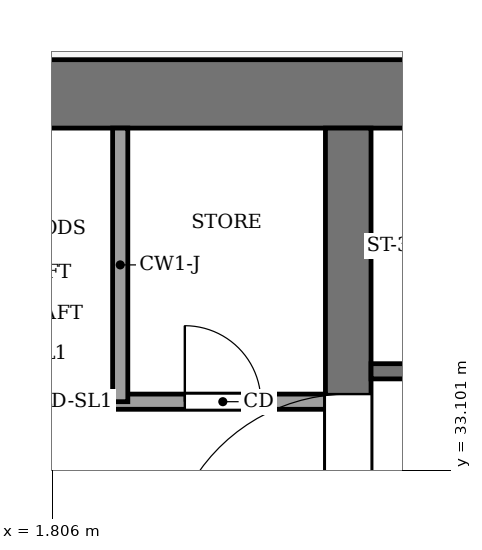
"""IFC4 building model, lengths in metres.
Left out: names, types, materials, properties, quantities, classifications, styles, units other than length and angle.
Written with IfcOpenShell. Run it as: python <this file> out.ifc"""

import sys

from ifc_helpers import new_model, si_unit, direction, frame, frame_2d, origin, place, context, subcontext, project, spatial, rectangle, extrude, element, fill, save


model = new_model("IFC4")
c1 = context("Model", 3, precision=1e-05, world=origin(), true_north=direction((0.0, 1.0)))
c2 = subcontext(c1, "Body", "Model", "MODEL_VIEW")
j1 = project(units=[si_unit("LENGTHUNIT", "METRE"), si_unit("PLANEANGLEUNIT", "RADIAN")], contexts=[c1])
p1 = place(None, origin())
s1 = spatial("IfcSite", under=j1, at=p1, CompositionType="ELEMENT")
p2 = place(p1, origin())
s2 = spatial("IfcBuilding", under=s1, at=p2, CompositionType="ELEMENT")
p3 = place(p2, frame((0.0, 0.0, 226.0)))
s3 = spatial("IfcBuildingStorey", under=s2, at=p3, CompositionType="ELEMENT", Elevation=226.0)
p4 = place(p3, frame((-13.5, 38.05, -0.25), z_axis=(0.0, 0.0, 1.0), x_axis=(1.0, 0.0, 0.0)))
e1 = element("IfcWall", 1, at=p4, inside=s3, PredefinedType="SHEAR", context=c2, shape_type="SweptSolid", body=[
    extrude(rectangle(XDim=27.0, YDim=0.9, at=frame_2d((13.5, 0.0))), origin(), (0.0, 0.0, 1.0), 7.12),
])
p5 = place(p3, frame((5.7, 18.4, -0.25), z_axis=(0.0, 0.0, 1.0), x_axis=(0.0, 1.0, 0.0)))
e2 = element("IfcWall", 2, at=p5, inside=s3, PredefinedType="SHEAR", context=c2, shape_type="SweptSolid", body=[
    extrude(rectangle(XDim=19.2, YDim=0.6, at=frame_2d((9.6, 0.0))), origin(), (0.0, 0.0, 1.0), 7.12),
])
p6 = place(p5, frame((13.3, 0.0, 0.25)))
e3 = element("IfcOpeningElement", 3, at=p6, cuts=e2, PredefinedType="OPENING", context=c2, shape_type="SweptSolid", body=[
    extrude(rectangle(XDim=2.4, YDim=2.4, at=frame_2d((1.2, 1.2))), frame((0.0, 0.31, 0.0), z_axis=(0.0, -1.0, 0.0), x_axis=(1.0, 0.0, 0.0)), (0.0, 0.0, 1.0), 0.62),
])
p7 = place(p3, frame((-5.4, 34.0, 0.0), z_axis=(0.0, 0.0, 1.0), x_axis=(1.0, 0.0, 0.0)))
e4 = element("IfcWall", 4, at=p7, inside=s3, PredefinedType="PARTITIONING", context=c2, shape_type="SweptSolid", body=[
    extrude(rectangle(XDim=10.8, YDim=0.2, at=frame_2d((5.4, 0.0))), origin(), (0.0, 0.0, 1.0), 6.87),
])
p8 = place(p7, frame((6.15, 0.0, 0.0)))
e5 = element("IfcOpeningElement", 5, at=p8, cuts=e4, PredefinedType="OPENING", context=c2, shape_type="SweptSolid", body=[
    extrude(rectangle(XDim=1.2, YDim=2.2, at=frame_2d((0.6, 1.1))), frame((0.0, 0.11, 0.0), z_axis=(0.0, -1.0, 0.0), x_axis=(1.0, 0.0, 0.0)), (0.0, 0.0, 1.0), 0.22),
])
p9 = place(p7, frame((8.95, 0.0, 0.0)))
e6 = element("IfcOpeningElement", 6, at=p9, cuts=e4, PredefinedType="OPENING", context=c2, shape_type="SweptSolid", body=[
    extrude(rectangle(XDim=1.0, YDim=2.1, at=frame_2d((0.5, 1.05))), frame((0.0, 0.11, 0.0), z_axis=(0.0, -1.0, 0.0), x_axis=(1.0, 0.0, 0.0)), (0.0, 0.0, 1.0), 0.22),
])
p10 = place(p3, frame((6.0, 34.4, 0.0), z_axis=(0.0, 0.0, 1.0), x_axis=(1.0, 0.0, 0.0)))
e7 = element("IfcWall", 7, at=p10, inside=s3, PredefinedType="PARTITIONING", context=c2, shape_type="SweptSolid", body=[
    extrude(rectangle(XDim=6.6, YDim=0.2, at=frame_2d((3.3, 0.0))), origin(), (0.0, 0.0, 1.0), 6.87),
])
p11 = place(p10, frame((4.8, 0.0, 0.0)))
e8 = element("IfcOpeningElement", 8, at=p11, cuts=e7, PredefinedType="OPENING", context=c2, shape_type="SweptSolid", body=[
    extrude(rectangle(XDim=1.2, YDim=2.2, at=frame_2d((0.6, 1.1))), frame((0.0, 0.11, 0.0), z_axis=(0.0, -1.0, 0.0), x_axis=(1.0, 0.0, 0.0)), (0.0, 0.0, 1.0), 0.22),
])
p12 = place(p3, frame((2.7, 34.0, 0.0), z_axis=(0.0, 0.0, 1.0), x_axis=(0.0, 1.0, 0.0)))
e9 = element("IfcWall", 9, at=p12, inside=s3, PredefinedType="PARTITIONING", context=c2, shape_type="SweptSolid", body=[
    extrude(rectangle(XDim=3.6, YDim=0.2, at=frame_2d((1.8, 0.0))), origin(), (0.0, 0.0, 1.0), 6.87),
])
p13 = place(p8, origin())
e10 = element("IfcDoor", 10, at=p13, inside=s3, OperationType="SLIDING_TO_LEFT", PredefinedType="DOOR", context=c2, shape_type="SweptSolid", body=[
    extrude(rectangle(XDim=1.2, YDim=2.2, at=frame_2d((0.6, 1.1))), frame((0.0, 0.025, 0.0), z_axis=(0.0, -1.0, 0.0), x_axis=(1.0, 0.0, 0.0)), (0.0, 0.0, 1.0), 0.05),
])
fill(e5, e10)
p14 = place(p9, origin())
e11 = element("IfcDoor", 11, at=p14, inside=s3, OperationType="SINGLE_SWING_LEFT", PredefinedType="DOOR", context=c2, shape_type="SweptSolid", body=[
    extrude(rectangle(XDim=1.0, YDim=2.1, at=frame_2d((0.5, 1.05))), frame((0.0, 0.025, 0.0), z_axis=(0.0, -1.0, 0.0), x_axis=(1.0, 0.0, 0.0)), (0.0, 0.0, 1.0), 0.05),
])
fill(e6, e11)
p15 = place(p6, origin())
e12 = element("IfcDoor", 12, at=p15, inside=s3, OperationType="DOUBLE_DOOR_SINGLE_SWING", PredefinedType="DOOR", context=c2, shape_type="SweptSolid", body=[
    extrude(rectangle(XDim=2.4, YDim=2.4, at=frame_2d((1.2, 1.2))), frame((0.0, 0.025, 0.0), z_axis=(0.0, -1.0, 0.0), x_axis=(1.0, 0.0, 0.0)), (0.0, 0.0, 1.0), 0.05),
])
fill(e3, e12)
save(model, sys.argv[1])
